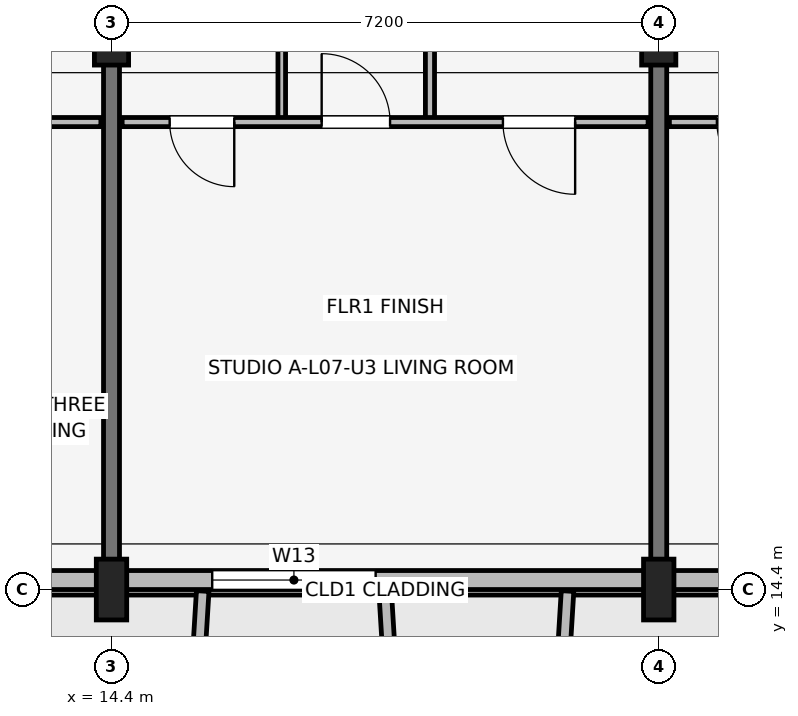
"""IFC4 building model, lengths in metres.
Left out: names, types, materials, properties, quantities, classifications, styles, units other than length and angle.
Written with IfcOpenShell. Run it as: python <this file> out.ifc"""

import sys

from ifc_helpers import new_model, si_unit, direction, frame, frame_2d, origin, origin_2d, place, context, subcontext, project, spatial, rectangle, extrude, element, fill, save


model = new_model("IFC4")
c1 = context("Model", 3, precision=1e-05, world=origin(), true_north=direction((0.0, 1.0)))
c2 = subcontext(c1, "Body", "Model", "MODEL_VIEW")
j1 = project(units=[si_unit("LENGTHUNIT", "METRE"), si_unit("PLANEANGLEUNIT", "RADIAN")], contexts=[c1])
p1 = place(None, origin())
s1 = spatial("IfcSite", under=j1, at=p1, CompositionType="ELEMENT")
p2 = place(p1, origin())
s2 = spatial("IfcBuilding", under=s1, at=p2, CompositionType="ELEMENT")
p3 = place(p2, frame((0.0, 0.0, 24.45)))
s3 = spatial("IfcBuildingStorey", under=s2, at=p3, CompositionType="ELEMENT", Elevation=24.45)
p4 = place(p3, frame((14.4, 14.4, 0.0), z_axis=(0.0, 0.0, 1.0), x_axis=(1.0, 0.0, 0.0)))
e1 = element("IfcColumn", 1, at=p4, inside=s3, PredefinedType="COLUMN", context=c2, shape_type="SweptSolid", body=[
    extrude(rectangle(XDim=0.4, YDim=0.8, at=origin_2d()), origin(), (0.0, 0.0, 1.0), 3.15),
])
p5 = place(p3, frame((14.4, 21.6, 0.0), z_axis=(0.0, 0.0, 1.0), x_axis=(1.0, 0.0, 0.0)))
e2 = element("IfcColumn", 2, at=p5, inside=s3, PredefinedType="COLUMN", context=c2, shape_type="SweptSolid", body=[
    extrude(rectangle(XDim=0.45, YDim=0.6, at=origin_2d()), origin(), (0.0, 0.0, 1.0), 3.15),
])
p6 = place(p3, frame((21.6, 14.4, 0.0), z_axis=(0.0, 0.0, 1.0), x_axis=(1.0, 0.0, 0.0)))
e3 = element("IfcColumn", 3, at=p6, inside=s3, PredefinedType="COLUMN", context=c2, shape_type="SweptSolid", body=[
    extrude(rectangle(XDim=0.4, YDim=0.8, at=origin_2d()), origin(), (0.0, 0.0, 1.0), 3.15),
])
p7 = place(p3, frame((21.6, 21.6, 0.0), z_axis=(0.0, 0.0, 1.0), x_axis=(1.0, 0.0, 0.0)))
e4 = element("IfcColumn", 4, at=p7, inside=s3, PredefinedType="COLUMN", context=c2, shape_type="SweptSolid", body=[
    extrude(rectangle(XDim=0.45, YDim=0.6, at=origin_2d()), origin(), (0.0, 0.0, 1.0), 3.15),
])
for number, where, z_axis, x_axis in (
    (5, (14.4, 14.75, 0.0), (0.0, 0.0, 1.0), (0.0, 1.0, 0.0)),
    (6, (21.6, 14.75, 0.0), (0.0, 0.0, 1.0), (0.0, 1.0, 0.0)),
):
    element("IfcWall", number, at=place(p3, frame(where, z_axis=z_axis, x_axis=x_axis)), inside=s3, PredefinedType="SHEAR", context=c2, shape_type="SweptSolid", body=[
        extrude(rectangle(XDim=9.4, YDim=0.21, at=frame_2d((4.7, 0.0))), origin(), (0.0, 0.0, 1.0), 3.15),
    ])
p8 = place(p3, frame((3.4, 14.525, 0.0), z_axis=(0.0, 0.0, 1.0), x_axis=(1.0, 0.0, 0.0)))
e7 = element("IfcWall", 7, at=p8, inside=s3, PredefinedType="SOLIDWALL", context=c2, shape_type="SweptSolid", body=[
    extrude(rectangle(XDim=29.2, YDim=0.25, at=frame_2d((14.6, 0.0))), origin(), (0.0, 0.0, 1.0), 2.43),
])
p9 = place(p8, frame((9.35, 0.0, 0.0), z_axis=(0.0, 0.0, 1.0), x_axis=(-1.0, 0.0, 0.0)))
e8 = element("IfcOpeningElement", 8, at=p9, cuts=e7, PredefinedType="OPENING", context=c2, shape_type="SweptSolid", body=[
    extrude(rectangle(XDim=1.5, YDim=2.15, at=frame_2d((0.75, 1.075))), frame((0.0, 0.135, 0.0), z_axis=(0.0, -1.0, 0.0), x_axis=(1.0, 0.0, 0.0)), (0.0, 0.0, 1.0), 0.27),
])
p10 = place(p8, frame((23.9, 0.0, 0.0), z_axis=(0.0, 0.0, 1.0), x_axis=(-1.0, 0.0, 0.0)))
e9 = element("IfcOpeningElement", 9, at=p10, cuts=e7, PredefinedType="OPENING", context=c2, shape_type="SweptSolid", body=[
    extrude(rectangle(XDim=1.8, YDim=2.15, at=frame_2d((0.9, 1.075))), frame((0.0, 0.135, 0.0), z_axis=(0.0, -1.0, 0.0), x_axis=(1.0, 0.0, 0.0)), (0.0, 0.0, 1.0), 0.27),
])
p11 = place(p8, frame((1.125, 0.0, 0.75)))
e10 = element("IfcOpeningElement", 10, at=p11, cuts=e7, PredefinedType="OPENING", context=c2, shape_type="SweptSolid", body=[
    extrude(rectangle(XDim=0.72, YDim=1.35, at=frame_2d((0.36, 0.675))), frame((0.0, 0.135, 0.0), z_axis=(0.0, -1.0, 0.0), x_axis=(1.0, 0.0, 0.0)), (0.0, 0.0, 1.0), 0.27),
])
p12 = place(p8, frame((5.155, 0.0, 0.75)))
e11 = element("IfcOpeningElement", 11, at=p12, cuts=e7, PredefinedType="OPENING", context=c2, shape_type="SweptSolid", body=[
    extrude(rectangle(XDim=0.72, YDim=1.35, at=frame_2d((0.36, 0.675))), frame((0.0, 0.135, 0.0), z_axis=(0.0, -1.0, 0.0), x_axis=(1.0, 0.0, 0.0)), (0.0, 0.0, 1.0), 0.27),
])
p13 = place(p8, frame((12.325, 0.0, 0.67)))
e12 = element("IfcOpeningElement", 12, at=p13, cuts=e7, PredefinedType="OPENING", context=c2, shape_type="SweptSolid", body=[
    extrude(rectangle(XDim=2.15, YDim=1.65, at=frame_2d((1.075, 0.825))), frame((0.0, 0.135, 0.0), z_axis=(0.0, -1.0, 0.0), x_axis=(1.0, 0.0, 0.0)), (0.0, 0.0, 1.0), 0.27),
])
p14 = place(p8, frame((19.555, 0.0, 0.75)))
e13 = element("IfcOpeningElement", 13, at=p14, cuts=e7, PredefinedType="OPENING", context=c2, shape_type="SweptSolid", body=[
    extrude(rectangle(XDim=0.72, YDim=1.35, at=frame_2d((0.36, 0.675))), frame((0.0, 0.135, 0.0), z_axis=(0.0, -1.0, 0.0), x_axis=(1.0, 0.0, 0.0)), (0.0, 0.0, 1.0), 0.27),
])
for number, where, z_axis, x_axis in (
    (14, (15.6, 14.38, 0.0), (0.0, 0.0, 1.0), (-0.061, -0.998, 0.0)),
    (15, (18.0, 14.38, 0.0), (0.0, 0.0, 1.0), (0.061, -0.998, 0.0)),
    (16, (20.4, 14.38, 0.0), (0.0, 0.0, 1.0), (-0.061, -0.998, 0.0)),
):
    element("IfcWall", number, at=place(p3, frame(where, z_axis=z_axis, x_axis=x_axis)), inside=s3, PredefinedType="ELEMENTEDWALL", context=c2, shape_type="SweptSolid", body=[
        extrude(rectangle(XDim=1.964, YDim=0.165, at=frame_2d((0.982, 0.0))), origin(), (0.0, 0.0, 1.0), 2.55),
    ])
p15 = place(p3, frame((7.34, 20.55, 0.0), z_axis=(0.0, 0.0, 1.0), x_axis=(1.0, 0.0, 0.0)))
e17 = element("IfcWall", 17, at=p15, inside=s3, PredefinedType="PARTITIONING", context=c2, shape_type="SweptSolid", body=[
    extrude(rectangle(XDim=6.92, YDim=0.12, at=frame_2d((3.46, 0.0))), origin(), (0.0, 0.0, 1.0), 2.38),
])
p16 = place(p15, frame((0.625, 0.0, 0.0)))
e18 = element("IfcOpeningElement", 18, at=p16, cuts=e17, PredefinedType="OPENING", context=c2, shape_type="SweptSolid", body=[
    extrude(rectangle(XDim=0.85, YDim=2.08, at=frame_2d((0.425, 1.04))), frame((0.0, 0.07, 0.0), z_axis=(0.0, -1.0, 0.0), x_axis=(1.0, 0.0, 0.0)), (0.0, 0.0, 1.0), 0.14),
])
p17 = place(p15, frame((3.675, 0.0, 0.0), z_axis=(0.0, 0.0, 1.0), x_axis=(-1.0, 0.0, 0.0)))
e19 = element("IfcOpeningElement", 19, at=p17, cuts=e17, PredefinedType="OPENING", context=c2, shape_type="SweptSolid", body=[
    extrude(rectangle(XDim=0.9, YDim=2.08, at=frame_2d((0.45, 1.04))), frame((0.0, 0.07, 0.0), z_axis=(0.0, -1.0, 0.0), x_axis=(1.0, 0.0, 0.0)), (0.0, 0.0, 1.0), 0.14),
])
p18 = place(p15, frame((5.16, 0.0, 0.0)))
e20 = element("IfcOpeningElement", 20, at=p18, cuts=e17, PredefinedType="OPENING", context=c2, shape_type="SweptSolid", body=[
    extrude(rectangle(XDim=0.95, YDim=2.08, at=frame_2d((0.475, 1.04))), frame((0.0, 0.07, 0.0), z_axis=(0.0, -1.0, 0.0), x_axis=(1.0, 0.0, 0.0)), (0.0, 0.0, 1.0), 0.14),
])
p19 = place(p3, frame((16.64, 20.55, 0.0), z_axis=(0.0, 0.0, 1.0), x_axis=(0.0, 1.0, 0.0)))
e21 = element("IfcWall", 21, at=p19, inside=s3, PredefinedType="PARTITIONING", context=c2, shape_type="SweptSolid", body=[
    extrude(rectangle(XDim=3.75, YDim=0.1, at=frame_2d((1.875, 0.0))), origin(), (0.0, 0.0, 1.0), 2.38),
])
p20 = place(p3, frame((18.59, 20.55, 0.0), z_axis=(0.0, 0.0, 1.0), x_axis=(0.0, 1.0, 0.0)))
e22 = element("IfcWall", 22, at=p20, inside=s3, PredefinedType="PARTITIONING", context=c2, shape_type="SweptSolid", body=[
    extrude(rectangle(XDim=3.75, YDim=0.12, at=frame_2d((1.875, 0.0))), origin(), (0.0, 0.0, 1.0), 2.38),
])
p21 = place(p3, frame((14.54, 20.55, 0.0), z_axis=(0.0, 0.0, 1.0), x_axis=(1.0, 0.0, 0.0)))
e23 = element("IfcWall", 23, at=p21, inside=s3, PredefinedType="PARTITIONING", context=c2, shape_type="SweptSolid", body=[
    extrude(rectangle(XDim=6.92, YDim=0.12, at=frame_2d((3.46, 0.0))), origin(), (0.0, 0.0, 1.0), 2.38),
])
p22 = place(p21, frame((1.475, 0.0, 0.0), z_axis=(0.0, 0.0, 1.0), x_axis=(-1.0, 0.0, 0.0)))
e24 = element("IfcOpeningElement", 24, at=p22, cuts=e23, PredefinedType="OPENING", context=c2, shape_type="SweptSolid", body=[
    extrude(rectangle(XDim=0.85, YDim=2.08, at=frame_2d((0.425, 1.04))), frame((0.0, 0.07, 0.0), z_axis=(0.0, -1.0, 0.0), x_axis=(1.0, 0.0, 0.0)), (0.0, 0.0, 1.0), 0.14),
])
p23 = place(p21, frame((2.625, 0.0, 0.0)))
e25 = element("IfcOpeningElement", 25, at=p23, cuts=e23, PredefinedType="OPENING", context=c2, shape_type="SweptSolid", body=[
    extrude(rectangle(XDim=0.9, YDim=2.08, at=frame_2d((0.45, 1.04))), frame((0.0, 0.07, 0.0), z_axis=(0.0, -1.0, 0.0), x_axis=(1.0, 0.0, 0.0)), (0.0, 0.0, 1.0), 0.14),
])
p24 = place(p21, frame((5.96, 0.0, 0.0), z_axis=(0.0, 0.0, 1.0), x_axis=(-1.0, 0.0, 0.0)))
e26 = element("IfcOpeningElement", 26, at=p24, cuts=e23, PredefinedType="OPENING", context=c2, shape_type="SweptSolid", body=[
    extrude(rectangle(XDim=0.95, YDim=2.08, at=frame_2d((0.475, 1.04))), frame((0.0, 0.07, 0.0), z_axis=(0.0, -1.0, 0.0), x_axis=(1.0, 0.0, 0.0)), (0.0, 0.0, 1.0), 0.14),
])
p25 = place(p3, frame((21.74, 20.55, 0.0), z_axis=(0.0, 0.0, 1.0), x_axis=(1.0, 0.0, 0.0)))
e27 = element("IfcWall", 27, at=p25, inside=s3, PredefinedType="PARTITIONING", context=c2, shape_type="SweptSolid", body=[
    extrude(rectangle(XDim=6.92, YDim=0.12, at=frame_2d((3.46, 0.0))), origin(), (0.0, 0.0, 1.0), 2.38),
])
p26 = place(p25, frame((1.475, 0.0, 0.0), z_axis=(0.0, 0.0, 1.0), x_axis=(-1.0, 0.0, 0.0)))
e28 = element("IfcOpeningElement", 28, at=p26, cuts=e27, PredefinedType="OPENING", context=c2, shape_type="SweptSolid", body=[
    extrude(rectangle(XDim=0.85, YDim=2.08, at=frame_2d((0.425, 1.04))), frame((0.0, 0.07, 0.0), z_axis=(0.0, -1.0, 0.0), x_axis=(1.0, 0.0, 0.0)), (0.0, 0.0, 1.0), 0.14),
])
p27 = place(p25, frame((2.775, 0.0, 0.0)))
e29 = element("IfcOpeningElement", 29, at=p27, cuts=e27, PredefinedType="OPENING", context=c2, shape_type="SweptSolid", body=[
    extrude(rectangle(XDim=0.9, YDim=2.08, at=frame_2d((0.45, 1.04))), frame((0.0, 0.07, 0.0), z_axis=(0.0, -1.0, 0.0), x_axis=(1.0, 0.0, 0.0)), (0.0, 0.0, 1.0), 0.14),
])
p28 = place(p25, frame((6.11, 0.0, 0.0), z_axis=(0.0, 0.0, 1.0), x_axis=(-1.0, 0.0, 0.0)))
e30 = element("IfcOpeningElement", 30, at=p28, cuts=e27, PredefinedType="OPENING", context=c2, shape_type="SweptSolid", body=[
    extrude(rectangle(XDim=0.95, YDim=2.08, at=frame_2d((0.475, 1.04))), frame((0.0, 0.07, 0.0), z_axis=(0.0, -1.0, 0.0), x_axis=(1.0, 0.0, 0.0)), (0.0, 0.0, 1.0), 0.14),
])
p29 = place(p13, origin())
e31 = element("IfcWindow", 31, at=p29, inside=s3, PartitioningType="SINGLE_PANEL", PredefinedType="WINDOW", context=c2, shape_type="SweptSolid", body=[
    extrude(rectangle(XDim=2.15, YDim=1.65, at=frame_2d((1.075, 0.825))), frame((0.0, 0.03, 0.0), z_axis=(0.0, -1.0, 0.0), x_axis=(1.0, 0.0, 0.0)), (0.0, 0.0, 1.0), 0.06),
])
fill(e12, e31)
p30 = place(p22, origin())
e32 = element("IfcDoor", 32, at=p30, inside=s3, OperationType="SINGLE_SWING_RIGHT", PredefinedType="DOOR", context=c2, shape_type="SweptSolid", body=[
    extrude(rectangle(XDim=0.85, YDim=2.08, at=frame_2d((0.425, 1.04))), frame((0.0, 0.025, 0.0), z_axis=(0.0, -1.0, 0.0), x_axis=(1.0, 0.0, 0.0)), (0.0, 0.0, 1.0), 0.05),
])
fill(e24, e32)
p31 = place(p23, origin())
e33 = element("IfcDoor", 33, at=p31, inside=s3, OperationType="SINGLE_SWING_LEFT", PredefinedType="DOOR", context=c2, shape_type="SweptSolid", body=[
    extrude(rectangle(XDim=0.9, YDim=2.08, at=frame_2d((0.45, 1.04))), frame((0.0, 0.025, 0.0), z_axis=(0.0, -1.0, 0.0), x_axis=(1.0, 0.0, 0.0)), (0.0, 0.0, 1.0), 0.05),
])
fill(e25, e33)
p32 = place(p24, origin())
e34 = element("IfcDoor", 34, at=p32, inside=s3, OperationType="SINGLE_SWING_RIGHT", PredefinedType="DOOR", context=c2, shape_type="SweptSolid", body=[
    extrude(rectangle(XDim=0.95, YDim=2.08, at=frame_2d((0.475, 1.04))), frame((0.0, 0.025, 0.0), z_axis=(0.0, -1.0, 0.0), x_axis=(1.0, 0.0, 0.0)), (0.0, 0.0, 1.0), 0.05),
])
fill(e26, e34)
p33 = place(p26, origin())
e35 = element("IfcDoor", 35, at=p33, inside=s3, OperationType="SINGLE_SWING_RIGHT", PredefinedType="DOOR", context=c2, shape_type="SweptSolid", body=[
    extrude(rectangle(XDim=0.85, YDim=2.08, at=frame_2d((0.425, 1.04))), frame((0.0, 0.025, 0.0), z_axis=(0.0, -1.0, 0.0), x_axis=(1.0, 0.0, 0.0)), (0.0, 0.0, 1.0), 0.05),
])
fill(e28, e35)
save(model, sys.argv[1])
